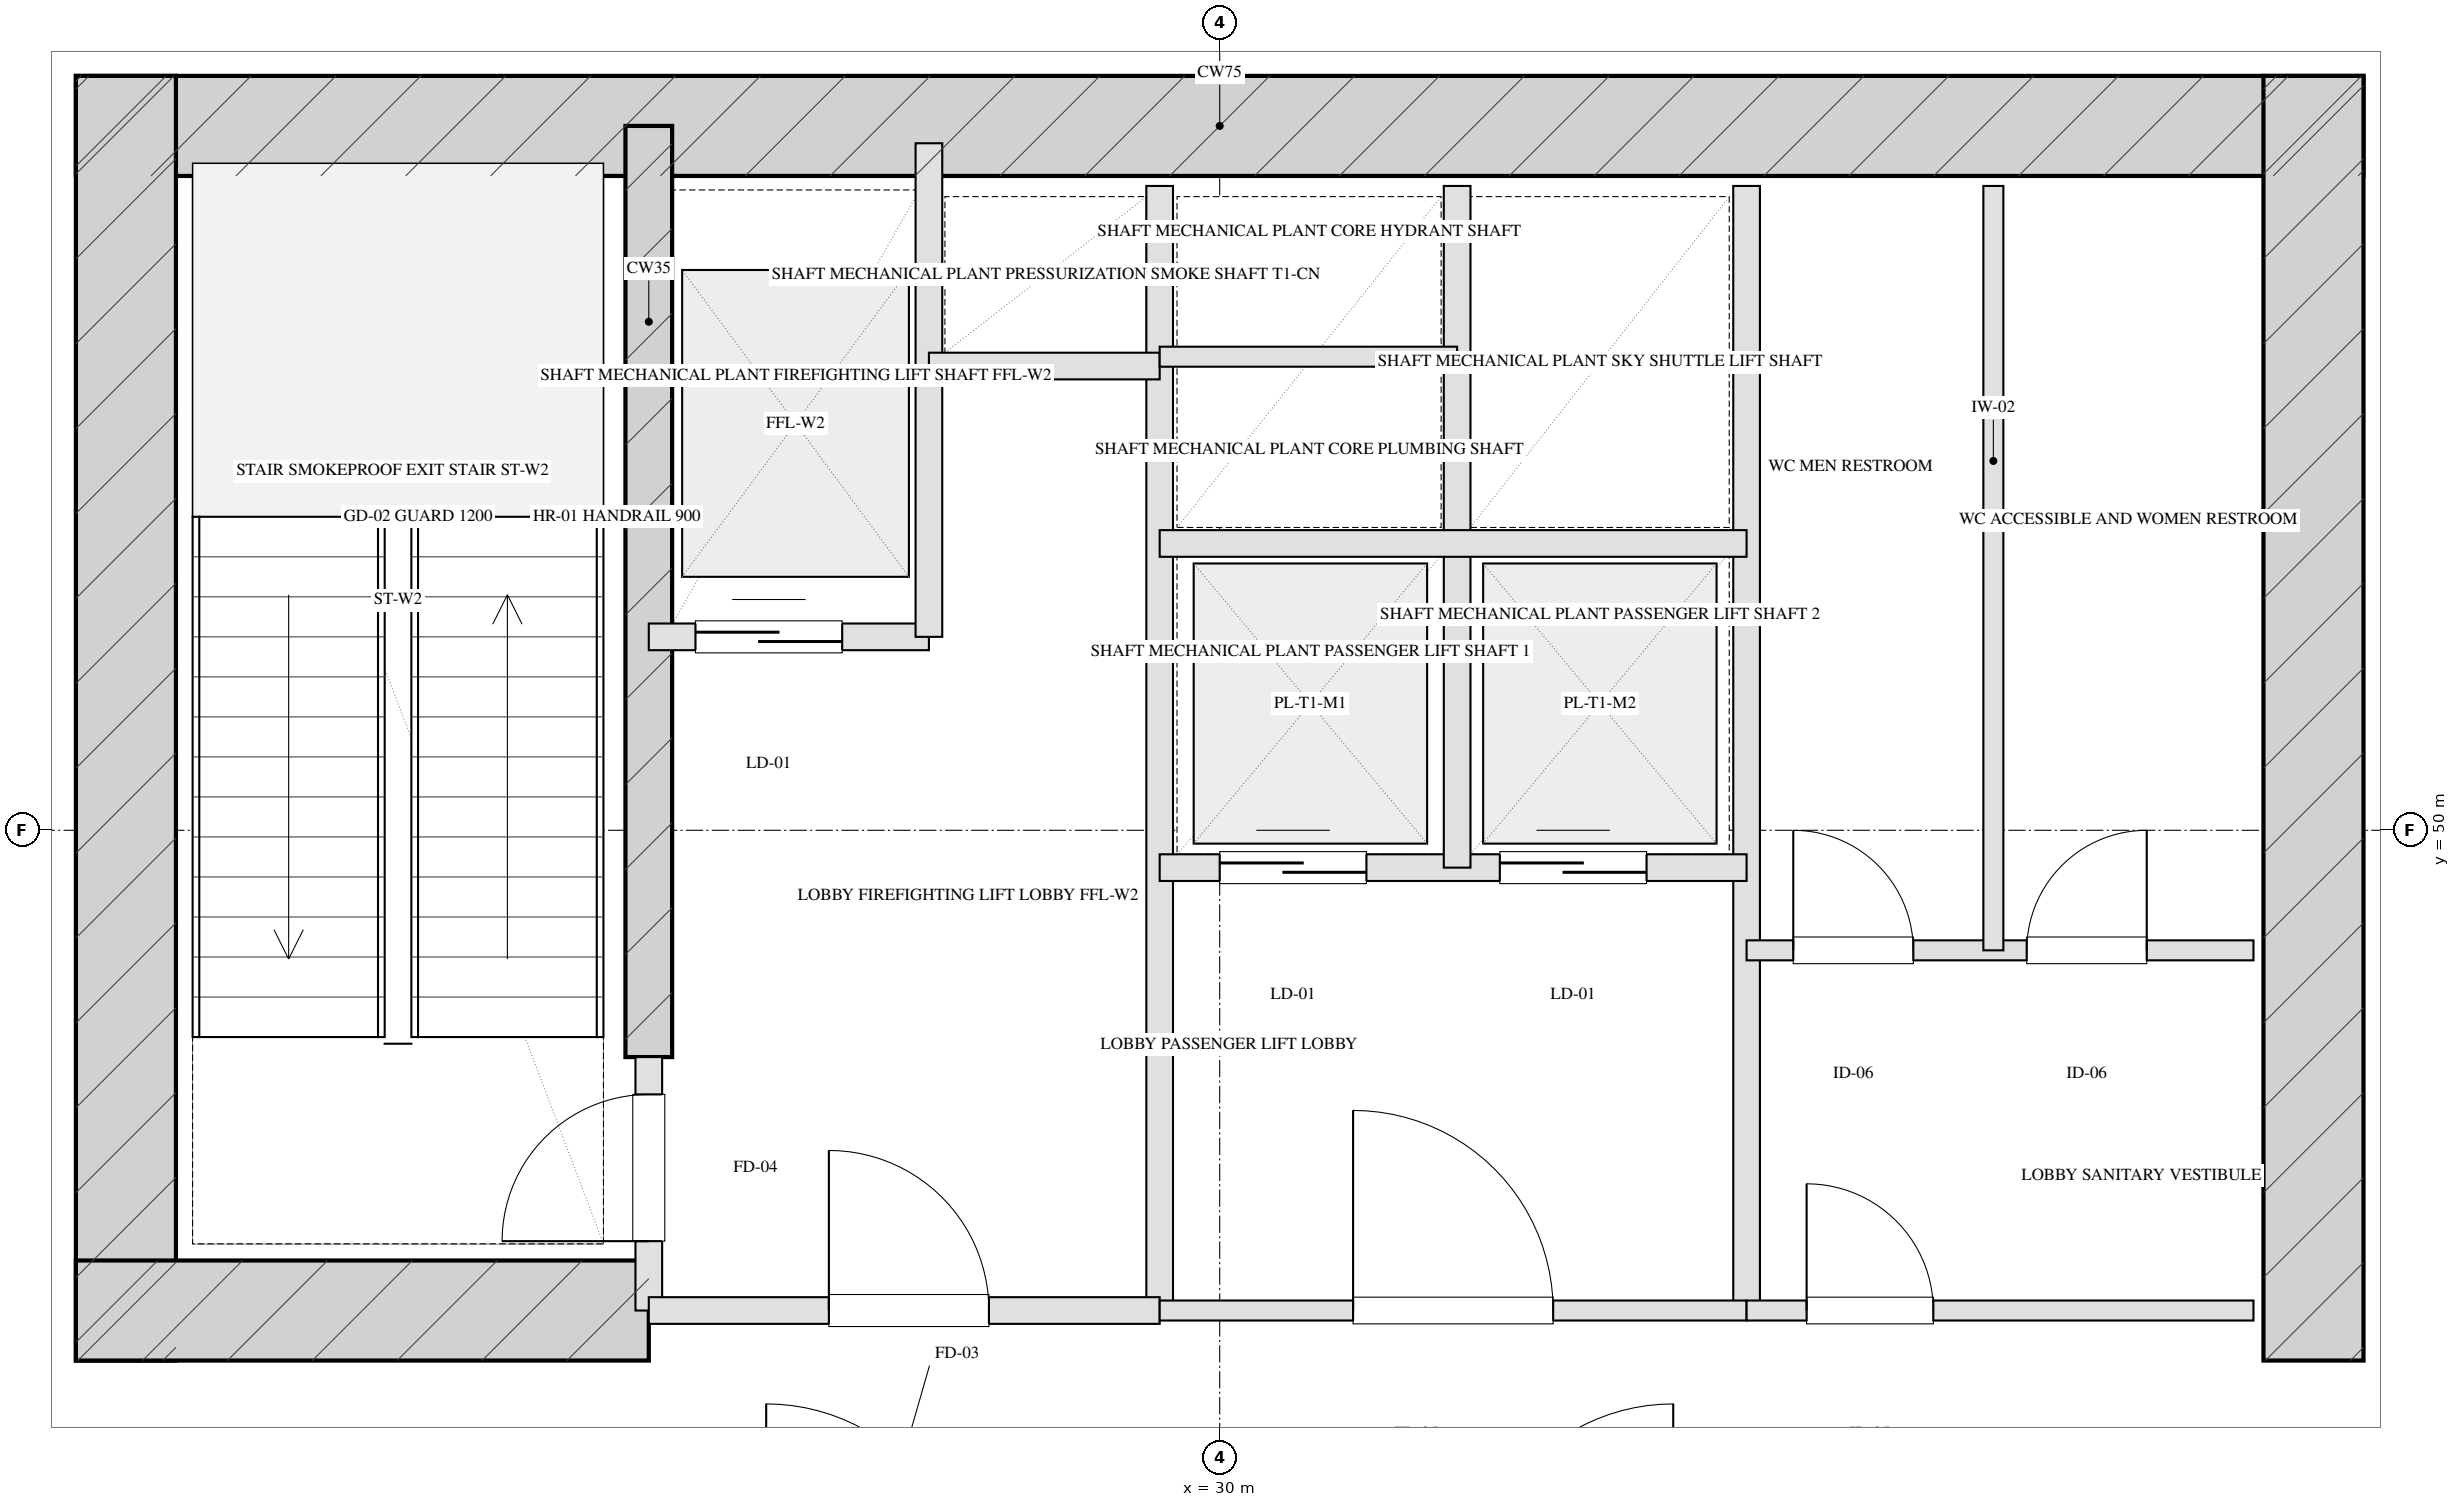
"""IFC4 building model, lengths in metres.
Left out: names, types, materials, properties, quantities, classifications, styles, units other than length and angle.
Written with IfcOpenShell. Run it as: python <this file> out.ifc"""

import sys

from ifc_helpers import new_model, si_unit, direction, frame, frame_2d, origin, place, context, subcontext, project, spatial, rectangle, extrude, element, fill, save


model = new_model("IFC4")
c1 = context("Model", 3, precision=1e-05, world=origin(), true_north=direction((0.0, 1.0)))
c2 = subcontext(c1, "Body", "Model", "MODEL_VIEW")
j1 = project(units=[si_unit("LENGTHUNIT", "METRE"), si_unit("PLANEANGLEUNIT", "RADIAN")], contexts=[c1])
p1 = place(None, origin())
s1 = spatial("IfcSite", under=j1, at=p1, CompositionType="ELEMENT")
p2 = place(p1, origin())
s2 = spatial("IfcBuilding", under=s1, at=p2, CompositionType="ELEMENT")
p3 = place(p2, frame((0.0, 0.0, 92.0)))
s3 = spatial("IfcBuildingStorey", under=s2, at=p3, CompositionType="ELEMENT", Elevation=92.0)
p4 = place(p3, frame((21.425, 55.28, 0.0), z_axis=(0.0, 0.0, 1.0), x_axis=(1.0, 0.0, 0.0)))
e1 = element("IfcWall", 1, at=p4, inside=s3, PredefinedType="SHEAR", context=c2, shape_type="SweptSolid", body=[
    extrude(rectangle(XDim=17.15, YDim=0.75, at=frame_2d((8.575, 0.0))), origin(), (0.0, 0.0, 1.0), 4.6),
])
for number, where, z_axis, x_axis in (
    (2, (21.8, 46.025, 0.0), (0.0, 0.0, 1.0), (0.0, 1.0, 0.0)),
    (3, (38.2, 46.025, 0.0), (0.0, 0.0, 1.0), (0.0, 1.0, 0.0)),
):
    element("IfcWall", number, at=place(p3, frame(where, z_axis=z_axis, x_axis=x_axis)), inside=s3, PredefinedType="SHEAR", context=c2, shape_type="SweptSolid", body=[
        extrude(rectangle(XDim=9.63, YDim=0.75, at=frame_2d((4.815, 0.0))), origin(), (0.0, 0.0, 1.0), 4.6),
    ])
p5 = place(p3, frame((25.72, 48.3, 0.0), z_axis=(0.0, 0.0, 1.0), x_axis=(0.0, 1.0, 0.0)))
e4 = element("IfcWall", 4, at=p5, inside=s3, PredefinedType="SHEAR", context=c2, shape_type="SweptSolid", body=[
    extrude(rectangle(XDim=6.98, YDim=0.35, at=frame_2d((3.49, 0.0))), origin(), (0.0, 0.0, 1.0), 4.6),
])
p6 = place(p3, frame((21.425, 46.4, 0.0), z_axis=(0.0, 0.0, 1.0), x_axis=(1.0, 0.0, 0.0)))
e5 = element("IfcWall", 5, at=p6, inside=s3, PredefinedType="SHEAR", context=c2, shape_type="SweptSolid", body=[
    extrude(rectangle(XDim=4.295, YDim=0.75, at=frame_2d((2.147, 0.0))), origin(), (0.0, 0.0, 1.0), 4.6),
])
p7 = place(p3, frame((25.72, 46.4, 0.0), z_axis=(0.0, 0.0, 1.0), x_axis=(0.0, 1.0, 0.0)))
e6 = element("IfcWall", 6, at=p7, inside=s3, PredefinedType="PARTITIONING", context=c2, shape_type="SweptSolid", body=[
    extrude(rectangle(XDim=1.9, YDim=0.2, at=frame_2d((0.95, 0.0))), origin(), (0.0, 0.0, 1.0), 4.305),
])
p8 = place(p7, frame((0.52, 0.0, 0.0)))
e7 = element("IfcOpeningElement", 7, at=p8, cuts=e6, PredefinedType="OPENING", context=c2, shape_type="SweptSolid", body=[
    extrude(rectangle(XDim=1.1, YDim=2.05, at=frame_2d((0.55, 1.025))), frame((0.0, 0.11, 0.0), z_axis=(0.0, -1.0, 0.0), x_axis=(1.0, 0.0, 0.0)), (0.0, 0.0, 1.0), 0.22),
])
p9 = place(p3, frame((29.55, 46.4, 0.0), z_axis=(0.0, 0.0, 1.0), x_axis=(0.0, 1.0, 0.0)))
e8 = element("IfcWall", 8, at=p9, inside=s3, PredefinedType="PARTITIONING", context=c2, shape_type="SweptSolid", body=[
    extrude(rectangle(XDim=8.43, YDim=0.2, at=frame_2d((4.215, 0.0))), origin(), (0.0, 0.0, 1.0), 4.305),
])
p10 = place(p3, frame((25.72, 46.4, 0.0), z_axis=(0.0, 0.0, 1.0), x_axis=(1.0, 0.0, 0.0)))
e9 = element("IfcWall", 9, at=p10, inside=s3, PredefinedType="PARTITIONING", context=c2, shape_type="SweptSolid", body=[
    extrude(rectangle(XDim=3.83, YDim=0.2, at=frame_2d((1.915, 0.0))), origin(), (0.0, 0.0, 1.0), 4.305),
])
p11 = place(p10, frame((1.35, 0.0, 0.0)))
e10 = element("IfcOpeningElement", 10, at=p11, cuts=e9, PredefinedType="OPENING", context=c2, shape_type="SweptSolid", body=[
    extrude(rectangle(XDim=1.2, YDim=2.05, at=frame_2d((0.6, 1.025))), frame((0.0, 0.11, 0.0), z_axis=(0.0, -1.0, 0.0), x_axis=(1.0, 0.0, 0.0)), (0.0, 0.0, 1.0), 0.22),
])
p12 = place(p3, frame((25.72, 51.45, 0.0), z_axis=(0.0, 0.0, 1.0), x_axis=(1.0, 0.0, 0.0)))
e11 = element("IfcWall", 11, at=p12, inside=s3, PredefinedType="PARTITIONING", context=c2, shape_type="SweptSolid", body=[
    extrude(rectangle(XDim=2.1, YDim=0.2, at=frame_2d((1.05, 0.0))), origin(), (0.0, 0.0, 1.0), 4.305),
])
p13 = place(p12, frame((0.35, 0.0, 0.0)))
e12 = element("IfcOpeningElement", 12, at=p13, cuts=e11, PredefinedType="OPENING", context=c2, shape_type="SweptSolid", body=[
    extrude(rectangle(XDim=1.1, YDim=2.05, at=frame_2d((0.55, 1.025))), frame((0.0, 0.11, 0.0), z_axis=(0.0, -1.0, 0.0), x_axis=(1.0, 0.0, 0.0)), (0.0, 0.0, 1.0), 0.22),
])
p14 = place(p3, frame((27.82, 51.45, 0.0), z_axis=(0.0, 0.0, 1.0), x_axis=(0.0, 1.0, 0.0)))
e13 = element("IfcWall", 13, at=p14, inside=s3, PredefinedType="PARTITIONING", context=c2, shape_type="SweptSolid", body=[
    extrude(rectangle(XDim=3.7, YDim=0.2, at=frame_2d((1.85, 0.0))), origin(), (0.0, 0.0, 1.0), 4.305),
])
p15 = place(p3, frame((27.82, 53.48, 0.0), z_axis=(0.0, 0.0, 1.0), x_axis=(1.0, 0.0, 0.0)))
e14 = element("IfcWall", 14, at=p15, inside=s3, PredefinedType="PARTITIONING", context=c2, shape_type="SweptSolid", body=[
    extrude(rectangle(XDim=1.73, YDim=0.2, at=frame_2d((0.865, 0.0))), origin(), (0.0, 0.0, 1.0), 4.305),
])
p16 = place(p3, frame((33.95, 46.4, 0.0), z_axis=(0.0, 0.0, 1.0), x_axis=(0.0, 1.0, 0.0)))
e15 = element("IfcWall", 15, at=p16, inside=s3, PredefinedType="PARTITIONING", context=c2, shape_type="SweptSolid", body=[
    extrude(rectangle(XDim=8.43, YDim=0.2, at=frame_2d((4.215, 0.0))), origin(), (0.0, 0.0, 1.0), 4.305),
])
p17 = place(p3, frame((29.55, 46.4, 0.0), z_axis=(0.0, 0.0, 1.0), x_axis=(1.0, 0.0, 0.0)))
e16 = element("IfcWall", 16, at=p17, inside=s3, PredefinedType="PARTITIONING", context=c2, shape_type="SweptSolid", body=[
    extrude(rectangle(XDim=4.4, YDim=0.15, at=frame_2d((2.2, 0.0))), origin(), (0.0, 0.0, 1.0), 4.305),
])
p18 = place(p17, frame((1.45, 0.0, 0.0)))
e17 = element("IfcOpeningElement", 17, at=p18, cuts=e16, PredefinedType="OPENING", context=c2, shape_type="SweptSolid", body=[
    extrude(rectangle(XDim=1.5, YDim=2.05, at=frame_2d((0.75, 1.025))), frame((0.0, 0.085, 0.0), z_axis=(0.0, -1.0, 0.0), x_axis=(1.0, 0.0, 0.0)), (0.0, 0.0, 1.0), 0.17),
])
p19 = place(p3, frame((29.55, 49.72, 0.0), z_axis=(0.0, 0.0, 1.0), x_axis=(1.0, 0.0, 0.0)))
e18 = element("IfcWall", 18, at=p19, inside=s3, PredefinedType="PARTITIONING", context=c2, shape_type="SweptSolid", body=[
    extrude(rectangle(XDim=4.4, YDim=0.2, at=frame_2d((2.2, 0.0))), origin(), (0.0, 0.0, 1.0), 4.305),
])
p20 = place(p19, frame((0.45, 0.0, 0.0)))
e19 = element("IfcOpeningElement", 19, at=p20, cuts=e18, PredefinedType="OPENING", context=c2, shape_type="SweptSolid", body=[
    extrude(rectangle(XDim=1.1, YDim=2.05, at=frame_2d((0.55, 1.025))), frame((0.0, 0.11, 0.0), z_axis=(0.0, -1.0, 0.0), x_axis=(1.0, 0.0, 0.0)), (0.0, 0.0, 1.0), 0.22),
])
p21 = place(p19, frame((2.55, 0.0, 0.0)))
e20 = element("IfcOpeningElement", 20, at=p21, cuts=e18, PredefinedType="OPENING", context=c2, shape_type="SweptSolid", body=[
    extrude(rectangle(XDim=1.1, YDim=2.05, at=frame_2d((0.55, 1.025))), frame((0.0, 0.11, 0.0), z_axis=(0.0, -1.0, 0.0), x_axis=(1.0, 0.0, 0.0)), (0.0, 0.0, 1.0), 0.22),
])
p22 = place(p3, frame((31.78, 49.72, 0.0), z_axis=(0.0, 0.0, 1.0), x_axis=(0.0, 1.0, 0.0)))
e21 = element("IfcWall", 21, at=p22, inside=s3, PredefinedType="PARTITIONING", context=c2, shape_type="SweptSolid", body=[
    extrude(rectangle(XDim=5.11, YDim=0.2, at=frame_2d((2.555, 0.0))), origin(), (0.0, 0.0, 1.0), 4.305),
])
p23 = place(p3, frame((29.55, 52.15, 0.0), z_axis=(0.0, 0.0, 1.0), x_axis=(1.0, 0.0, 0.0)))
e22 = element("IfcWall", 22, at=p23, inside=s3, PredefinedType="PARTITIONING", context=c2, shape_type="SweptSolid", body=[
    extrude(rectangle(XDim=4.4, YDim=0.2, at=frame_2d((2.2, 0.0))), origin(), (0.0, 0.0, 1.0), 4.305),
])
p24 = place(p3, frame((29.55, 53.55, 0.0), z_axis=(0.0, 0.0, 1.0), x_axis=(1.0, 0.0, 0.0)))
e23 = element("IfcWall", 23, at=p24, inside=s3, PredefinedType="PARTITIONING", context=c2, shape_type="SweptSolid", body=[
    extrude(rectangle(XDim=2.23, YDim=0.15, at=frame_2d((1.115, 0.0))), origin(), (0.0, 0.0, 1.0), 4.305),
])
p25 = place(p3, frame((33.95, 46.4, 0.0), z_axis=(0.0, 0.0, 1.0), x_axis=(1.0, 0.0, 0.0)))
e24 = element("IfcWall", 24, at=p25, inside=s3, PredefinedType="PARTITIONING", context=c2, shape_type="SweptSolid", body=[
    extrude(rectangle(XDim=3.8, YDim=0.15, at=frame_2d((1.9, 0.0))), origin(), (0.0, 0.0, 1.0), 4.305),
])
p26 = place(p25, frame((0.45, 0.0, 0.0)))
e25 = element("IfcOpeningElement", 25, at=p26, cuts=e24, PredefinedType="OPENING", context=c2, shape_type="SweptSolid", body=[
    extrude(rectangle(XDim=0.95, YDim=2.05, at=frame_2d((0.475, 1.025))), frame((0.0, 0.085, 0.0), z_axis=(0.0, -1.0, 0.0), x_axis=(1.0, 0.0, 0.0)), (0.0, 0.0, 1.0), 0.17),
])
p27 = place(p3, frame((33.95, 49.1, 0.0), z_axis=(0.0, 0.0, 1.0), x_axis=(1.0, 0.0, 0.0)))
e26 = element("IfcWall", 26, at=p27, inside=s3, PredefinedType="PARTITIONING", context=c2, shape_type="SweptSolid", body=[
    extrude(rectangle(XDim=3.8, YDim=0.15, at=frame_2d((1.9, 0.0))), origin(), (0.0, 0.0, 1.0), 4.305),
])
p28 = place(p27, frame((0.35, 0.0, 0.0)))
e27 = element("IfcOpeningElement", 27, at=p28, cuts=e26, PredefinedType="OPENING", context=c2, shape_type="SweptSolid", body=[
    extrude(rectangle(XDim=0.9, YDim=2.05, at=frame_2d((0.45, 1.025))), frame((0.0, 0.085, 0.0), z_axis=(0.0, -1.0, 0.0), x_axis=(1.0, 0.0, 0.0)), (0.0, 0.0, 1.0), 0.17),
])
p29 = place(p27, frame((2.1, 0.0, 0.0)))
e28 = element("IfcOpeningElement", 28, at=p29, cuts=e26, PredefinedType="OPENING", context=c2, shape_type="SweptSolid", body=[
    extrude(rectangle(XDim=0.9, YDim=2.05, at=frame_2d((0.45, 1.025))), frame((0.0, 0.085, 0.0), z_axis=(0.0, -1.0, 0.0), x_axis=(1.0, 0.0, 0.0)), (0.0, 0.0, 1.0), 0.17),
])
p30 = place(p3, frame((35.8, 49.1, 0.0), z_axis=(0.0, 0.0, 1.0), x_axis=(0.0, 1.0, 0.0)))
e29 = element("IfcWall", 29, at=p30, inside=s3, PredefinedType="PARTITIONING", context=c2, shape_type="SweptSolid", body=[
    extrude(rectangle(XDim=5.73, YDim=0.15, at=frame_2d((2.865, 0.0))), origin(), (0.0, 0.0, 1.0), 4.305),
])
p31 = place(p8, origin())
e30 = element("IfcDoor", 30, at=p31, inside=s3, OperationType="SINGLE_SWING_LEFT", PredefinedType="DOOR", context=c2, shape_type="SweptSolid", body=[
    extrude(rectangle(XDim=1.1, YDim=2.05, at=frame_2d((0.55, 1.025))), frame((0.0, 0.025, 0.0), z_axis=(0.0, -1.0, 0.0), x_axis=(1.0, 0.0, 0.0)), (0.0, 0.0, 1.0), 0.05),
])
fill(e7, e30)
p32 = place(p11, origin())
e31 = element("IfcDoor", 31, at=p32, inside=s3, OperationType="SINGLE_SWING_LEFT", PredefinedType="DOOR", context=c2, shape_type="SweptSolid", body=[
    extrude(rectangle(XDim=1.2, YDim=2.05, at=frame_2d((0.6, 1.025))), frame((0.0, 0.025, 0.0), z_axis=(0.0, -1.0, 0.0), x_axis=(1.0, 0.0, 0.0)), (0.0, 0.0, 1.0), 0.05),
])
fill(e10, e31)
p33 = place(p13, origin())
e32 = element("IfcDoor", 32, at=p33, inside=s3, OperationType="DOUBLE_DOOR_SLIDING", PredefinedType="DOOR", context=c2, shape_type="SweptSolid", body=[
    extrude(rectangle(XDim=1.1, YDim=2.05, at=frame_2d((0.55, 1.025))), frame((0.0, 0.025, 0.0), z_axis=(0.0, -1.0, 0.0), x_axis=(1.0, 0.0, 0.0)), (0.0, 0.0, 1.0), 0.05),
])
fill(e12, e32)
p34 = place(p18, origin())
e33 = element("IfcDoor", 33, at=p34, inside=s3, OperationType="SINGLE_SWING_LEFT", PredefinedType="DOOR", context=c2, shape_type="SweptSolid", body=[
    extrude(rectangle(XDim=1.5, YDim=2.05, at=frame_2d((0.75, 1.025))), frame((0.0, 0.025, 0.0), z_axis=(0.0, -1.0, 0.0), x_axis=(1.0, 0.0, 0.0)), (0.0, 0.0, 1.0), 0.05),
])
fill(e17, e33)
p35 = place(p20, origin())
e34 = element("IfcDoor", 34, at=p35, inside=s3, OperationType="DOUBLE_DOOR_SLIDING", PredefinedType="DOOR", context=c2, shape_type="SweptSolid", body=[
    extrude(rectangle(XDim=1.1, YDim=2.05, at=frame_2d((0.55, 1.025))), frame((0.0, 0.025, 0.0), z_axis=(0.0, -1.0, 0.0), x_axis=(1.0, 0.0, 0.0)), (0.0, 0.0, 1.0), 0.05),
])
fill(e19, e34)
p36 = place(p21, origin())
e35 = element("IfcDoor", 35, at=p36, inside=s3, OperationType="DOUBLE_DOOR_SLIDING", PredefinedType="DOOR", context=c2, shape_type="SweptSolid", body=[
    extrude(rectangle(XDim=1.1, YDim=2.05, at=frame_2d((0.55, 1.025))), frame((0.0, 0.025, 0.0), z_axis=(0.0, -1.0, 0.0), x_axis=(1.0, 0.0, 0.0)), (0.0, 0.0, 1.0), 0.05),
])
fill(e20, e35)
p37 = place(p26, origin())
e36 = element("IfcDoor", 36, at=p37, inside=s3, OperationType="SINGLE_SWING_LEFT", PredefinedType="DOOR", context=c2, shape_type="SweptSolid", body=[
    extrude(rectangle(XDim=0.95, YDim=2.05, at=frame_2d((0.475, 1.025))), frame((0.0, 0.025, 0.0), z_axis=(0.0, -1.0, 0.0), x_axis=(1.0, 0.0, 0.0)), (0.0, 0.0, 1.0), 0.05),
])
fill(e25, e36)
p38 = place(p28, origin())
e37 = element("IfcDoor", 37, at=p38, inside=s3, OperationType="SINGLE_SWING_LEFT", PredefinedType="DOOR", context=c2, shape_type="SweptSolid", body=[
    extrude(rectangle(XDim=0.9, YDim=2.05, at=frame_2d((0.45, 1.025))), frame((0.0, 0.025, 0.0), z_axis=(0.0, -1.0, 0.0), x_axis=(1.0, 0.0, 0.0)), (0.0, 0.0, 1.0), 0.05),
])
fill(e27, e37)
p39 = place(p29, origin())
e38 = element("IfcDoor", 38, at=p39, inside=s3, OperationType="SINGLE_SWING_RIGHT", PredefinedType="DOOR", context=c2, shape_type="SweptSolid", body=[
    extrude(rectangle(XDim=0.9, YDim=2.05, at=frame_2d((0.45, 1.025))), frame((0.0, 0.025, 0.0), z_axis=(0.0, -1.0, 0.0), x_axis=(1.0, 0.0, 0.0)), (0.0, 0.0, 1.0), 0.05),
])
fill(e28, e38)
save(model, sys.argv[1])
